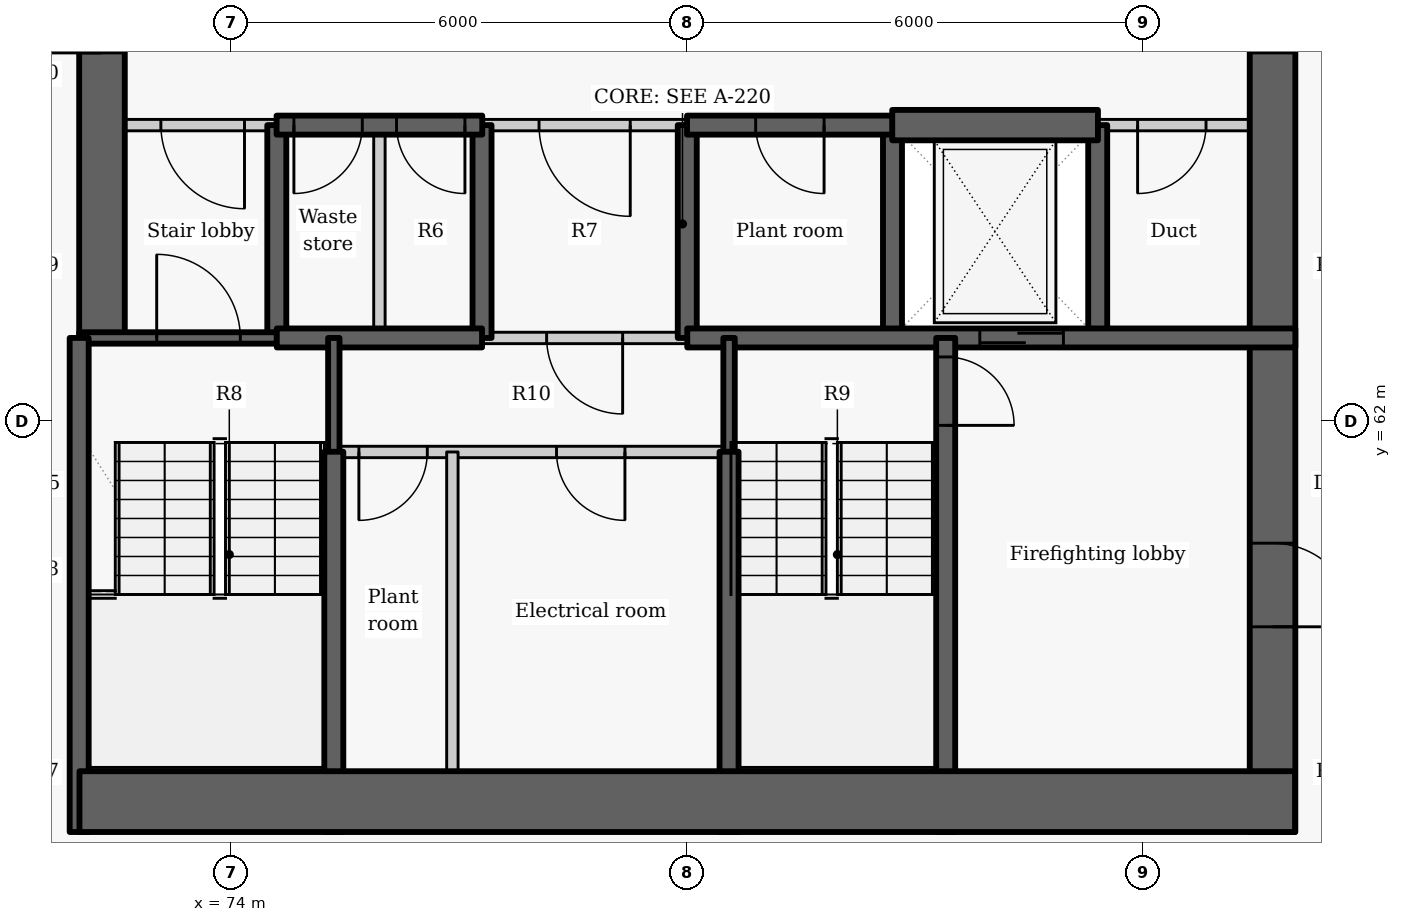
"""IFC4 building model, lengths in metres.
Left out: names, types, materials, properties, quantities, classifications, styles, units other than length and angle.
Written with IfcOpenShell. Run it as: python <this file> out.ifc"""

import sys

from ifc_helpers import new_model, si_unit, direction, frame, frame_2d, origin, place, context, subcontext, project, spatial, rectangle, extrude, element, fill, save


model = new_model("IFC4")
c1 = context("Model", 3, precision=1e-05, world=origin(), true_north=direction((0.0, 1.0)))
c2 = subcontext(c1, "Body", "Model", "MODEL_VIEW")
j1 = project(units=[si_unit("LENGTHUNIT", "METRE"), si_unit("PLANEANGLEUNIT", "RADIAN")], contexts=[c1])
p1 = place(None, origin())
s1 = spatial("IfcSite", under=j1, at=p1, CompositionType="ELEMENT")
p2 = place(p1, origin())
s2 = spatial("IfcBuilding", under=s1, at=p2, CompositionType="ELEMENT")
p3 = place(p2, frame((0.0, 0.0, 107.4)))
s3 = spatial("IfcBuildingStorey", under=s2, at=p3, CompositionType="ELEMENT", Elevation=107.4)
p4 = place(p3, frame((74.6, 63.1, -0.275), z_axis=(0.0, 0.0, 1.0), x_axis=(0.0, 1.0, 0.0)))
e1 = element("IfcWall", 1, at=p4, inside=s3, PredefinedType="SHEAR", context=c2, shape_type="SweptSolid", body=[
    extrude(rectangle(XDim=2.8, YDim=0.25, at=frame_2d((1.4, 0.0))), origin(), (0.0, 0.0, 1.0), 3.3),
])
p5 = place(p3, frame((72.3, 63.1, -0.275), z_axis=(0.0, 0.0, 1.0), x_axis=(0.0, 1.0, 0.0)))
e2 = element("IfcWall", 2, at=p5, inside=s3, PredefinedType="SHEAR", context=c2, shape_type="SweptSolid", body=[
    extrude(rectangle(XDim=9.1, YDim=0.6, at=frame_2d((4.55, 0.0))), origin(), (0.0, 0.0, 1.0), 3.3),
])
p6 = place(p5, frame((3.75, 0.0, 0.275)))
e3 = element("IfcOpeningElement", 3, at=p6, cuts=e2, PredefinedType="OPENING", context=c2, shape_type="SweptSolid", body=[
    extrude(rectangle(XDim=1.5, YDim=2.1, at=frame_2d((0.75, 1.05))), frame((0.0, 0.31, 0.0), z_axis=(0.0, -1.0, 0.0), x_axis=(1.0, 0.0, 0.0)), (0.0, 0.0, 1.0), 0.62),
])
for number, where, z_axis, x_axis in (
    (4, (77.3, 63.1, -0.275), (0.0, 0.0, 1.0), (0.0, 1.0, 0.0)),
    (5, (80.0, 63.1, -0.275), (0.0, 0.0, 1.0), (0.0, 1.0, 0.0)),
    (6, (82.7, 63.1, -0.275), (0.0, 0.0, 1.0), (0.0, 1.0, 0.0)),
    (7, (85.4, 63.1, -0.275), (0.0, 0.0, 1.0), (0.0, 1.0, 0.0)),
):
    element("IfcWall", number, at=place(p3, frame(where, z_axis=z_axis, x_axis=x_axis)), inside=s3, PredefinedType="SHEAR", context=c2, shape_type="SweptSolid", body=[
        extrude(rectangle(XDim=2.8, YDim=0.25, at=frame_2d((1.4, 0.0))), origin(), (0.0, 0.0, 1.0), 3.3),
    ])
p7 = place(p3, frame((87.7, 72.2, -0.275), z_axis=(0.0, 0.0, 1.0), x_axis=(0.0, -1.0, 0.0)))
e8 = element("IfcWall", 8, at=p7, inside=s3, PredefinedType="SHEAR", context=c2, shape_type="SweptSolid", body=[
    extrude(rectangle(XDim=15.6, YDim=0.6, at=frame_2d((7.8, 0.0))), origin(), (0.0, 0.0, 1.0), 3.3),
])
p8 = place(p7, frame((3.85, 0.0, 0.275)))
e9 = element("IfcOpeningElement", 9, at=p8, cuts=e8, PredefinedType="OPENING", context=c2, shape_type="SweptSolid", body=[
    extrude(rectangle(XDim=1.5, YDim=2.1, at=frame_2d((0.75, 1.05))), frame((0.0, 0.31, 0.0), z_axis=(0.0, -1.0, 0.0), x_axis=(1.0, 0.0, 0.0)), (0.0, 0.0, 1.0), 0.62),
])
p9 = place(p7, frame((11.8, 0.0, 0.275)))
e10 = element("IfcOpeningElement", 10, at=p9, cuts=e8, PredefinedType="OPENING", context=c2, shape_type="SweptSolid", body=[
    extrude(rectangle(XDim=1.1, YDim=2.1, at=frame_2d((0.55, 1.05))), frame((0.0, 0.31, 0.0), z_axis=(0.0, -1.0, 0.0), x_axis=(1.0, 0.0, 0.0)), (0.0, 0.0, 1.0), 0.62),
])
p10 = place(p3, frame((74.603, 65.9, 0.0), z_axis=(0.0, 0.0, 1.0), x_axis=(-1.0, 0.0, 0.0)))
e11 = element("IfcWall", 11, at=p10, inside=s3, PredefinedType="PARTITIONING", context=c2, shape_type="SweptSolid", body=[
    extrude(rectangle(XDim=2.603, YDim=0.15, at=frame_2d((1.302, 0.0))), origin(), (0.0, 0.0, 1.0), 3.025),
])
p11 = place(p10, frame((0.428, 0.0, 0.0)))
e12 = element("IfcOpeningElement", 12, at=p11, cuts=e11, PredefinedType="OPENING", context=c2, shape_type="SweptSolid", body=[
    extrude(rectangle(XDim=1.1, YDim=2.1, at=frame_2d((0.55, 1.05))), frame((0.0, 0.085, 0.0), z_axis=(0.0, -1.0, 0.0), x_axis=(1.0, 0.0, 0.0)), (0.0, 0.0, 1.0), 0.17),
])
p12 = place(p3, frame((80.003, 65.9, 0.0), z_axis=(0.0, 0.0, 1.0), x_axis=(-1.0, 0.0, 0.0)))
e13 = element("IfcWall", 13, at=p12, inside=s3, PredefinedType="PARTITIONING", context=c2, shape_type="SweptSolid", body=[
    extrude(rectangle(XDim=2.706, YDim=0.15, at=frame_2d((1.353, 0.0))), origin(), (0.0, 0.0, 1.0), 3.025),
])
p13 = place(p12, frame((0.753, 0.0, 0.0)))
e14 = element("IfcOpeningElement", 14, at=p13, cuts=e13, PredefinedType="OPENING", context=c2, shape_type="SweptSolid", body=[
    extrude(rectangle(XDim=1.2, YDim=2.1, at=frame_2d((0.6, 1.05))), frame((0.0, 0.085, 0.0), z_axis=(0.0, -1.0, 0.0), x_axis=(1.0, 0.0, 0.0)), (0.0, 0.0, 1.0), 0.17),
])
p14 = place(p3, frame((88.0, 65.9, 0.0), z_axis=(0.0, 0.0, 1.0), x_axis=(-1.0, 0.0, 0.0)))
e15 = element("IfcWall", 15, at=p14, inside=s3, PredefinedType="PARTITIONING", context=c2, shape_type="SweptSolid", body=[
    extrude(rectangle(XDim=2.603, YDim=0.15, at=frame_2d((1.302, 0.0))), origin(), (0.0, 0.0, 1.0), 3.025),
])
p15 = place(p14, frame((1.175, 0.0, 0.0)))
e16 = element("IfcOpeningElement", 16, at=p15, cuts=e15, PredefinedType="OPENING", context=c2, shape_type="SweptSolid", body=[
    extrude(rectangle(XDim=0.9, YDim=2.1, at=frame_2d((0.45, 1.05))), frame((0.0, 0.085, 0.0), z_axis=(0.0, -1.0, 0.0), x_axis=(1.0, 0.0, 0.0)), (0.0, 0.0, 1.0), 0.17),
])
p16 = place(p3, frame((77.303, 65.9, -0.275), z_axis=(0.0, 0.0, 1.0), x_axis=(-1.0, 0.0, 0.0)))
e17 = element("IfcWall", 17, at=p16, inside=s3, PredefinedType="SHEAR", context=c2, shape_type="SweptSolid", body=[
    extrude(rectangle(XDim=2.706, YDim=0.25, at=frame_2d((1.353, 0.0))), origin(), (0.0, 0.0, 1.0), 3.3),
])
p17 = place(p16, frame((1.578, 0.0, 0.275)))
e18 = element("IfcOpeningElement", 18, at=p17, cuts=e17, PredefinedType="OPENING", context=c2, shape_type="SweptSolid", body=[
    extrude(rectangle(XDim=0.9, YDim=2.1, at=frame_2d((0.45, 1.05))), frame((0.0, 0.135, 0.0), z_axis=(0.0, -1.0, 0.0), x_axis=(1.0, 0.0, 0.0)), (0.0, 0.0, 1.0), 0.27),
])
p18 = place(p16, frame((0.228, 0.0, 0.275)))
e19 = element("IfcOpeningElement", 19, at=p18, cuts=e17, PredefinedType="OPENING", context=c2, shape_type="SweptSolid", body=[
    extrude(rectangle(XDim=0.9, YDim=2.1, at=frame_2d((0.45, 1.05))), frame((0.0, 0.135, 0.0), z_axis=(0.0, -1.0, 0.0), x_axis=(1.0, 0.0, 0.0)), (0.0, 0.0, 1.0), 0.27),
])
p19 = place(p3, frame((82.703, 65.9, -0.275), z_axis=(0.0, 0.0, 1.0), x_axis=(-1.0, 0.0, 0.0)))
e20 = element("IfcWall", 20, at=p19, inside=s3, PredefinedType="SHEAR", context=c2, shape_type="SweptSolid", body=[
    extrude(rectangle(XDim=2.706, YDim=0.25, at=frame_2d((1.353, 0.0))), origin(), (0.0, 0.0, 1.0), 3.3),
])
p20 = place(p19, frame((0.903, 0.0, 0.275)))
e21 = element("IfcOpeningElement", 21, at=p20, cuts=e20, PredefinedType="OPENING", context=c2, shape_type="SweptSolid", body=[
    extrude(rectangle(XDim=0.9, YDim=2.1, at=frame_2d((0.45, 1.05))), frame((0.0, 0.135, 0.0), z_axis=(0.0, -1.0, 0.0), x_axis=(1.0, 0.0, 0.0)), (0.0, 0.0, 1.0), 0.27),
])
p21 = place(p3, frame((82.697, 65.9, -0.275), z_axis=(0.0, 0.0, 1.0), x_axis=(1.0, 0.0, 0.0)))
e22 = element("IfcWall", 22, at=p21, inside=s3, PredefinedType="SHEAR", context=c2, shape_type="SweptSolid", body=[
    extrude(rectangle(XDim=2.706, YDim=0.4, at=frame_2d((1.353, 0.0))), origin(), (0.0, 0.0, 1.0), 3.3),
])
p22 = place(p3, frame((72.0, 63.1, -0.275), z_axis=(0.0, 0.0, 1.0), x_axis=(1.0, 0.0, 0.0)))
e23 = element("IfcWall", 23, at=p22, inside=s3, PredefinedType="SHEAR", context=c2, shape_type="SweptSolid", body=[
    extrude(rectangle(XDim=2.6, YDim=0.15, at=frame_2d((1.3, 0.0))), origin(), (0.0, 0.0, 1.0), 3.3),
])
p23 = place(p22, frame((1.02, 0.0, 0.275)))
e24 = element("IfcOpeningElement", 24, at=p23, cuts=e23, PredefinedType="OPENING", context=c2, shape_type="SweptSolid", body=[
    extrude(rectangle(XDim=1.1, YDim=2.1, at=frame_2d((0.55, 1.05))), frame((0.0, 0.085, 0.0), z_axis=(0.0, -1.0, 0.0), x_axis=(1.0, 0.0, 0.0)), (0.0, 0.0, 1.0), 0.17),
])
p24 = place(p3, frame((75.95, 63.1, 0.0), z_axis=(0.0, 0.0, 1.0), x_axis=(0.0, 1.0, 0.0)))
e25 = element("IfcWall", 25, at=p24, inside=s3, PredefinedType="PARTITIONING", context=c2, shape_type="SweptSolid", body=[
    extrude(rectangle(XDim=2.8, YDim=0.15, at=frame_2d((1.4, 0.0))), origin(), (0.0, 0.0, 1.0), 3.025),
])
p25 = place(p3, frame((74.6, 63.1, -0.275), z_axis=(0.0, 0.0, 1.0), x_axis=(1.0, 0.0, 0.0)))
e26 = element("IfcWall", 26, at=p25, inside=s3, PredefinedType="SHEAR", context=c2, shape_type="SweptSolid", body=[
    extrude(rectangle(XDim=2.7, YDim=0.25, at=frame_2d((1.35, 0.0))), origin(), (0.0, 0.0, 1.0), 3.3),
])
p26 = place(p3, frame((80.0, 63.1, -0.275), z_axis=(0.0, 0.0, 1.0), x_axis=(1.0, 0.0, 0.0)))
e27 = element("IfcWall", 27, at=p26, inside=s3, PredefinedType="SHEAR", context=c2, shape_type="SweptSolid", body=[
    extrude(rectangle(XDim=8.0, YDim=0.25, at=frame_2d((4.0, 0.0))), origin(), (0.0, 0.0, 1.0), 3.3),
])
p27 = place(p26, frame((3.849, 0.0, 0.275)))
e28 = element("IfcOpeningElement", 28, at=p27, cuts=e27, PredefinedType="OPENING", context=c2, shape_type="SweptSolid", body=[
    extrude(rectangle(XDim=1.1, YDim=2.1, at=frame_2d((0.55, 1.05))), frame((0.0, 0.135, 0.0), z_axis=(0.0, -1.0, 0.0), x_axis=(1.0, 0.0, 0.0)), (0.0, 0.0, 1.0), 0.27),
])
p28 = place(p3, frame((80.0, 63.1, 0.0), z_axis=(0.0, 0.0, 1.0), x_axis=(-1.0, 0.0, 0.0)))
e29 = element("IfcWall", 29, at=p28, inside=s3, PredefinedType="PARTITIONING", context=c2, shape_type="SweptSolid", body=[
    extrude(rectangle(XDim=2.7, YDim=0.15, at=frame_2d((1.35, 0.0))), origin(), (0.0, 0.0, 1.0), 3.025),
])
p29 = place(p28, frame((0.85, 0.0, 0.0)))
e30 = element("IfcOpeningElement", 30, at=p29, cuts=e29, PredefinedType="OPENING", context=c2, shape_type="SweptSolid", body=[
    extrude(rectangle(XDim=1.0, YDim=2.1, at=frame_2d((0.5, 1.05))), frame((0.0, 0.085, 0.0), z_axis=(0.0, -1.0, 0.0), x_axis=(1.0, 0.0, 0.0)), (0.0, 0.0, 1.0), 0.17),
])
p30 = place(p3, frame((75.35, 61.597, -0.275), z_axis=(0.0, 0.0, 1.0), x_axis=(0.0, 1.0, 0.0)))
e31 = element("IfcWall", 31, at=p30, inside=s3, PredefinedType="SHEAR", context=c2, shape_type="SweptSolid", body=[
    extrude(rectangle(XDim=1.503, YDim=0.15, at=frame_2d((0.751, 0.0))), origin(), (0.0, 0.0, 1.0), 3.3),
])
p31 = place(p3, frame((75.35, 56.6, -0.275), z_axis=(0.0, 0.0, 1.0), x_axis=(0.0, 1.0, 0.0)))
e32 = element("IfcWall", 32, at=p31, inside=s3, PredefinedType="SHEAR", context=c2, shape_type="SweptSolid", body=[
    extrude(rectangle(XDim=5.003, YDim=0.25, at=frame_2d((2.501, 0.0))), origin(), (0.0, 0.0, 1.0), 3.3),
])
p32 = place(p3, frame((72.0, 56.6, -0.275), z_axis=(0.0, 0.0, 1.0), x_axis=(0.0, 1.0, 0.0)))
e33 = element("IfcWall", 33, at=p32, inside=s3, PredefinedType="SHEAR", context=c2, shape_type="SweptSolid", body=[
    extrude(rectangle(XDim=6.5, YDim=0.25, at=frame_2d((3.25, 0.0))), origin(), (0.0, 0.0, 1.0), 3.3),
])
p33 = place(p3, frame((83.4, 63.1, -0.275), z_axis=(0.0, 0.0, 1.0), x_axis=(0.0, -1.0, 0.0)))
e34 = element("IfcWall", 34, at=p33, inside=s3, PredefinedType="SHEAR", context=c2, shape_type="SweptSolid", body=[
    extrude(rectangle(XDim=6.5, YDim=0.25, at=frame_2d((3.25, 0.0))), origin(), (0.0, 0.0, 1.0), 3.3),
])
p34 = place(p33, frame((0.25, 0.0, 0.275)))
e35 = element("IfcOpeningElement", 35, at=p34, cuts=e34, PredefinedType="OPENING", context=c2, shape_type="SweptSolid", body=[
    extrude(rectangle(XDim=0.9, YDim=2.1, at=frame_2d((0.45, 1.05))), frame((0.0, 0.135, 0.0), z_axis=(0.0, -1.0, 0.0), x_axis=(1.0, 0.0, 0.0)), (0.0, 0.0, 1.0), 0.27),
])
p35 = place(p3, frame((80.55, 61.597, -0.275), z_axis=(0.0, 0.0, 1.0), x_axis=(0.0, 1.0, 0.0)))
e36 = element("IfcWall", 36, at=p35, inside=s3, PredefinedType="SHEAR", context=c2, shape_type="SweptSolid", body=[
    extrude(rectangle(XDim=1.503, YDim=0.15, at=frame_2d((0.751, 0.0))), origin(), (0.0, 0.0, 1.0), 3.3),
])
p36 = place(p3, frame((80.55, 56.6, -0.275), z_axis=(0.0, 0.0, 1.0), x_axis=(0.0, 1.0, 0.0)))
e37 = element("IfcWall", 37, at=p36, inside=s3, PredefinedType="SHEAR", context=c2, shape_type="SweptSolid", body=[
    extrude(rectangle(XDim=5.003, YDim=0.25, at=frame_2d((2.501, 0.0))), origin(), (0.0, 0.0, 1.0), 3.3),
])
p37 = place(p3, frame((80.55, 61.6, 0.0), z_axis=(0.0, 0.0, 1.0), x_axis=(-1.0, 0.0, 0.0)))
e38 = element("IfcWall", 38, at=p37, inside=s3, PredefinedType="PARTITIONING", context=c2, shape_type="SweptSolid", body=[
    extrude(rectangle(XDim=5.2, YDim=0.15, at=frame_2d((2.6, 0.0))), origin(), (0.0, 0.0, 1.0), 3.025),
])
p38 = place(p37, frame((3.97, 0.0, 0.0)))
e39 = element("IfcOpeningElement", 39, at=p38, cuts=e38, PredefinedType="OPENING", context=c2, shape_type="SweptSolid", body=[
    extrude(rectangle(XDim=0.9, YDim=2.1, at=frame_2d((0.45, 1.05))), frame((0.0, 0.085, 0.0), z_axis=(0.0, -1.0, 0.0), x_axis=(1.0, 0.0, 0.0)), (0.0, 0.0, 1.0), 0.17),
])
p39 = place(p37, frame((1.37, 0.0, 0.0)))
e40 = element("IfcOpeningElement", 40, at=p39, cuts=e38, PredefinedType="OPENING", context=c2, shape_type="SweptSolid", body=[
    extrude(rectangle(XDim=0.9, YDim=2.1, at=frame_2d((0.45, 1.05))), frame((0.0, 0.085, 0.0), z_axis=(0.0, -1.0, 0.0), x_axis=(1.0, 0.0, 0.0)), (0.0, 0.0, 1.0), 0.17),
])
p40 = place(p3, frame((76.91, 56.6, 0.0), z_axis=(0.0, 0.0, 1.0), x_axis=(0.0, 1.0, 0.0)))
e41 = element("IfcWall", 41, at=p40, inside=s3, PredefinedType="PARTITIONING", context=c2, shape_type="SweptSolid", body=[
    extrude(rectangle(XDim=5.0, YDim=0.15, at=frame_2d((2.5, 0.0))), origin(), (0.0, 0.0, 1.0), 3.025),
])
p41 = place(p3, frame((72.004, 57.0, -0.275), z_axis=(0.0, 0.0, 1.0), x_axis=(1.0, 0.0, 0.0)))
e42 = element("IfcWall", 42, at=p41, inside=s3, PredefinedType="SHEAR", context=c2, shape_type="SweptSolid", body=[
    extrude(rectangle(XDim=15.992, YDim=0.8, at=frame_2d((7.996, 0.0))), origin(), (0.0, 0.0, 1.0), 3.3),
])
p42 = place(p11, origin())
e43 = element("IfcDoor", 43, at=p42, inside=s3, OperationType="SINGLE_SWING_LEFT", PredefinedType="DOOR", context=c2, shape_type="SweptSolid", body=[
    extrude(rectangle(XDim=1.1, YDim=2.1, at=frame_2d((0.55, 1.05))), frame((0.0, 0.025, 0.0), z_axis=(0.0, -1.0, 0.0), x_axis=(1.0, 0.0, 0.0)), (0.0, 0.0, 1.0), 0.05),
])
fill(e12, e43)
p43 = place(p17, origin())
e44 = element("IfcDoor", 44, at=p43, inside=s3, OperationType="SINGLE_SWING_RIGHT", PredefinedType="DOOR", context=c2, shape_type="SweptSolid", body=[
    extrude(rectangle(XDim=0.9, YDim=2.1, at=frame_2d((0.45, 1.05))), frame((0.0, 0.025, 0.0), z_axis=(0.0, -1.0, 0.0), x_axis=(1.0, 0.0, 0.0)), (0.0, 0.0, 1.0), 0.05),
])
fill(e18, e44)
p44 = place(p18, origin())
e45 = element("IfcDoor", 45, at=p44, inside=s3, OperationType="SINGLE_SWING_LEFT", PredefinedType="DOOR", context=c2, shape_type="SweptSolid", body=[
    extrude(rectangle(XDim=0.9, YDim=2.1, at=frame_2d((0.45, 1.05))), frame((0.0, 0.025, 0.0), z_axis=(0.0, -1.0, 0.0), x_axis=(1.0, 0.0, 0.0)), (0.0, 0.0, 1.0), 0.05),
])
fill(e19, e45)
p45 = place(p13, origin())
e46 = element("IfcDoor", 46, at=p45, inside=s3, OperationType="DOUBLE_DOOR_SINGLE_SWING", PredefinedType="DOOR", context=c2, shape_type="SweptSolid", body=[
    extrude(rectangle(XDim=1.2, YDim=2.1, at=frame_2d((0.6, 1.05))), frame((0.0, 0.025, 0.0), z_axis=(0.0, -1.0, 0.0), x_axis=(1.0, 0.0, 0.0)), (0.0, 0.0, 1.0), 0.05),
])
fill(e14, e46)
p46 = place(p20, origin())
e47 = element("IfcDoor", 47, at=p46, inside=s3, OperationType="SINGLE_SWING_LEFT", PredefinedType="DOOR", context=c2, shape_type="SweptSolid", body=[
    extrude(rectangle(XDim=0.9, YDim=2.1, at=frame_2d((0.45, 1.05))), frame((0.0, 0.025, 0.0), z_axis=(0.0, -1.0, 0.0), x_axis=(1.0, 0.0, 0.0)), (0.0, 0.0, 1.0), 0.05),
])
fill(e21, e47)
p47 = place(p27, origin())
e48 = element("IfcDoor", 48, at=p47, inside=s3, OperationType="SLIDING_TO_LEFT", PredefinedType="DOOR", context=c2, shape_type="SweptSolid", body=[
    extrude(rectangle(XDim=1.1, YDim=2.1, at=frame_2d((0.55, 1.05))), frame((0.0, 0.025, 0.0), z_axis=(0.0, -1.0, 0.0), x_axis=(1.0, 0.0, 0.0)), (0.0, 0.0, 1.0), 0.05),
])
fill(e28, e48)
p48 = place(p15, origin())
e49 = element("IfcDoor", 49, at=p48, inside=s3, OperationType="SINGLE_SWING_RIGHT", PredefinedType="DOOR", context=c2, shape_type="SweptSolid", body=[
    extrude(rectangle(XDim=0.9, YDim=2.1, at=frame_2d((0.45, 1.05))), frame((0.0, 0.025, 0.0), z_axis=(0.0, -1.0, 0.0), x_axis=(1.0, 0.0, 0.0)), (0.0, 0.0, 1.0), 0.05),
])
fill(e16, e49)
p49 = place(p29, origin())
e50 = element("IfcDoor", 50, at=p49, inside=s3, OperationType="SINGLE_SWING_LEFT", PredefinedType="DOOR", context=c2, shape_type="SweptSolid", body=[
    extrude(rectangle(XDim=1.0, YDim=2.1, at=frame_2d((0.5, 1.05))), frame((0.0, 0.025, 0.0), z_axis=(0.0, -1.0, 0.0), x_axis=(1.0, 0.0, 0.0)), (0.0, 0.0, 1.0), 0.05),
])
fill(e30, e50)
p50 = place(p38, origin())
e51 = element("IfcDoor", 51, at=p50, inside=s3, OperationType="SINGLE_SWING_RIGHT", PredefinedType="DOOR", context=c2, shape_type="SweptSolid", body=[
    extrude(rectangle(XDim=0.9, YDim=2.1, at=frame_2d((0.45, 1.05))), frame((0.0, 0.025, 0.0), z_axis=(0.0, -1.0, 0.0), x_axis=(1.0, 0.0, 0.0)), (0.0, 0.0, 1.0), 0.05),
])
fill(e39, e51)
p51 = place(p39, origin())
e52 = element("IfcDoor", 52, at=p51, inside=s3, OperationType="SINGLE_SWING_LEFT", PredefinedType="DOOR", context=c2, shape_type="SweptSolid", body=[
    extrude(rectangle(XDim=0.9, YDim=2.1, at=frame_2d((0.45, 1.05))), frame((0.0, 0.025, 0.0), z_axis=(0.0, -1.0, 0.0), x_axis=(1.0, 0.0, 0.0)), (0.0, 0.0, 1.0), 0.05),
])
fill(e40, e52)
p52 = place(p23, origin())
e53 = element("IfcDoor", 53, at=p52, inside=s3, OperationType="SINGLE_SWING_LEFT", PredefinedType="DOOR", context=c2, shape_type="SweptSolid", body=[
    extrude(rectangle(XDim=1.1, YDim=2.1, at=frame_2d((0.55, 1.05))), frame((0.0, 0.025, 0.0), z_axis=(0.0, -1.0, 0.0), x_axis=(1.0, 0.0, 0.0)), (0.0, 0.0, 1.0), 0.05),
])
fill(e24, e53)
p53 = place(p34, origin())
e54 = element("IfcDoor", 54, at=p53, inside=s3, OperationType="SINGLE_SWING_RIGHT", PredefinedType="DOOR", context=c2, shape_type="SweptSolid", body=[
    extrude(rectangle(XDim=0.9, YDim=2.1, at=frame_2d((0.45, 1.05))), frame((0.0, 0.025, 0.0), z_axis=(0.0, -1.0, 0.0), x_axis=(1.0, 0.0, 0.0)), (0.0, 0.0, 1.0), 0.05),
])
fill(e35, e54)
p54 = place(p8, origin())
e55 = element("IfcDoor", 55, at=p54, inside=s3, OperationType="DOUBLE_DOOR_SINGLE_SWING", PredefinedType="DOOR", context=c2, shape_type="SweptSolid", body=[
    extrude(rectangle(XDim=1.5, YDim=2.1, at=frame_2d((0.75, 1.05))), frame((0.0, 0.025, 0.0), z_axis=(0.0, -1.0, 0.0), x_axis=(1.0, 0.0, 0.0)), (0.0, 0.0, 1.0), 0.05),
])
fill(e9, e55)
p55 = place(p9, origin())
e56 = element("IfcDoor", 56, at=p55, inside=s3, OperationType="SINGLE_SWING_RIGHT", PredefinedType="DOOR", context=c2, shape_type="SweptSolid", body=[
    extrude(rectangle(XDim=1.1, YDim=2.1, at=frame_2d((0.55, 1.05))), frame((0.0, 0.025, 0.0), z_axis=(0.0, -1.0, 0.0), x_axis=(1.0, 0.0, 0.0)), (0.0, 0.0, 1.0), 0.05),
])
fill(e10, e56)
save(model, sys.argv[1])
